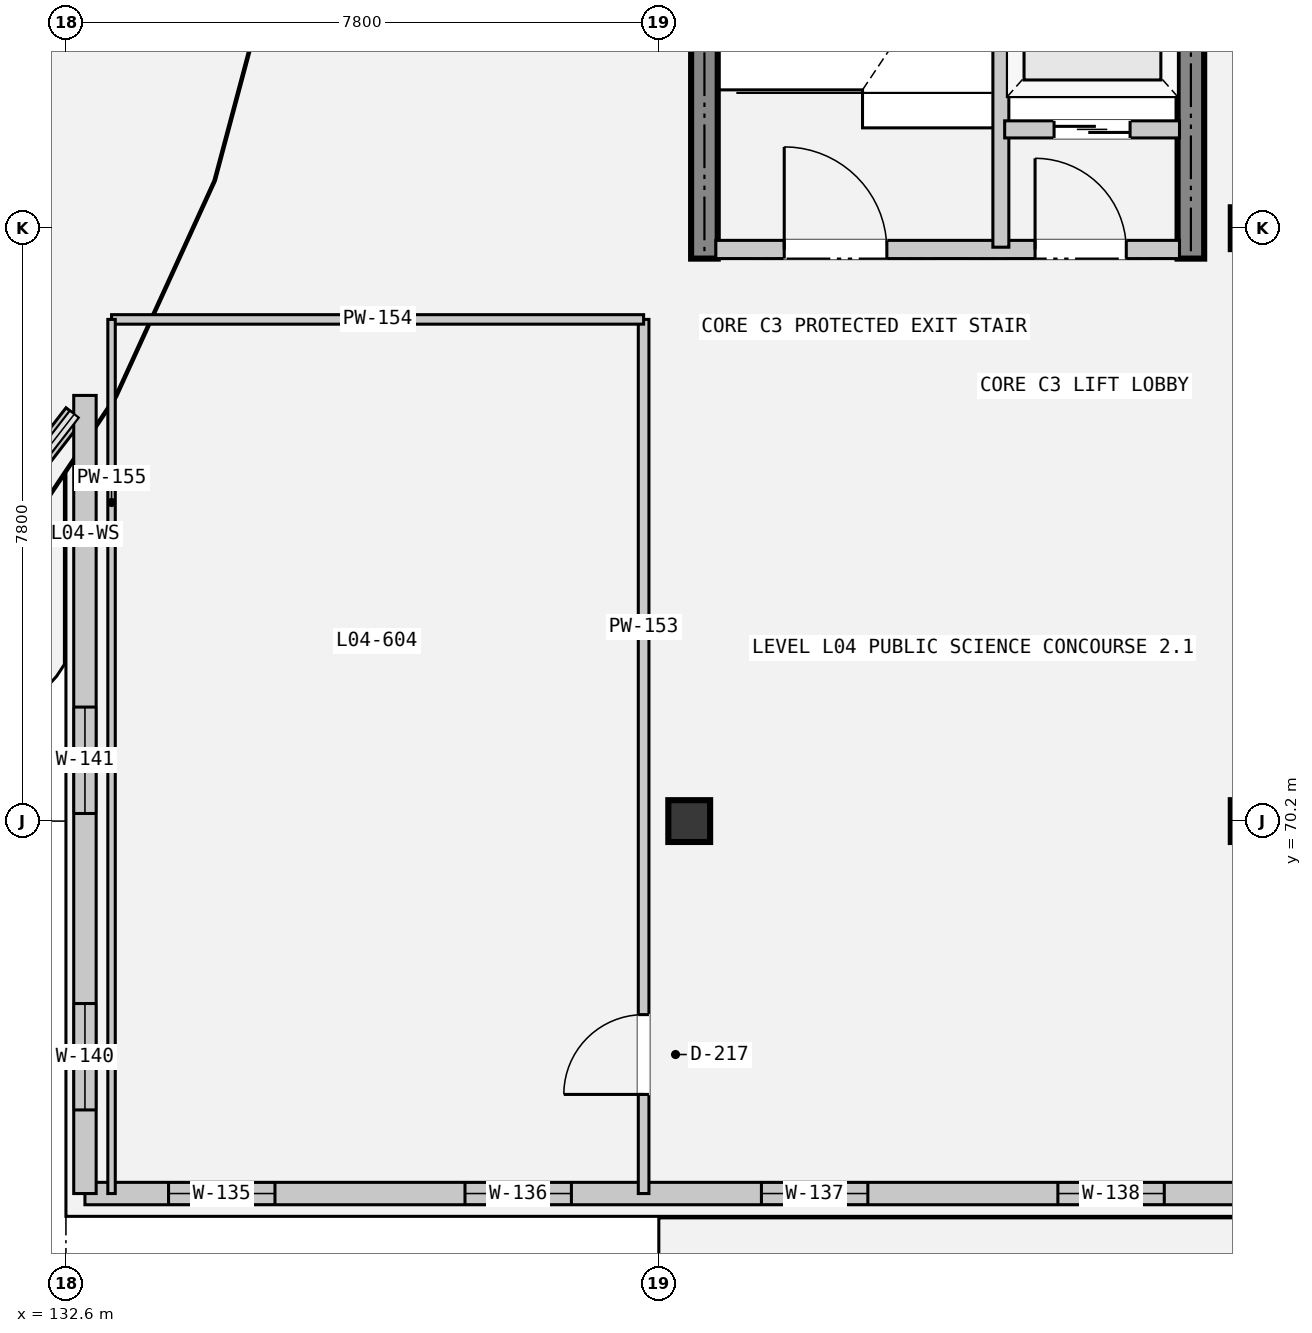
"""IFC4 building model, lengths in metres.
Left out: names, types, materials, properties, quantities, classifications, styles, units other than length and angle.
Written with IfcOpenShell. Run it as: python <this file> out.ifc"""

import sys

from ifc_helpers import new_model, si_unit, direction, frame, frame_2d, origin, origin_2d, place, context, subcontext, project, spatial, rectangle, extrude, element, fill, save


model = new_model("IFC4")
c1 = context("Model", 3, precision=1e-05, world=origin(), true_north=direction((0.0, 1.0)))
c2 = subcontext(c1, "Body", "Model", "MODEL_VIEW")
j1 = project(units=[si_unit("LENGTHUNIT", "METRE"), si_unit("PLANEANGLEUNIT", "RADIAN")], contexts=[c1])
p1 = place(None, origin())
s1 = spatial("IfcSite", under=j1, at=p1, CompositionType="ELEMENT")
p2 = place(p1, origin())
s2 = spatial("IfcBuilding", under=s1, at=p2, CompositionType="ELEMENT")
p3 = place(p2, frame((0.0, 0.0, 19.8)))
s3 = spatial("IfcBuildingStorey", under=s2, at=p3, CompositionType="ELEMENT", Elevation=19.8)
for number, where, z_axis, x_axis in (
    (1, (140.8, 70.2, 0.0), (0.0, 0.0, 1.0), (1.0, 0.0, 0.0)),
    (2, (148.2, 70.2, 0.0), (0.0, 0.0, 1.0), (1.0, 0.0, 0.0)),
    (3, (148.2, 78.0, 0.0), (0.0, 0.0, 1.0), (1.0, 0.0, 0.0)),
):
    element("IfcColumn", number, at=place(p3, frame(where, z_axis=z_axis, x_axis=x_axis)), inside=s3, PredefinedType="COLUMN", context=c2, shape_type="SweptSolid", body=[
        extrude(rectangle(XDim=0.55, YDim=0.55, at=origin_2d()), origin(), (0.0, 0.0, 1.0), 4.5),
    ])
for number, where, z_axis, x_axis in (
    (4, (141.0, 77.6, 0.0), (0.0, 0.0, 1.0), (0.0, 1.0, 0.0)),
    (5, (147.4, 77.6, 0.0), (0.0, 0.0, 1.0), (0.0, 1.0, 0.0)),
):
    element("IfcWall", number, at=place(p3, frame(where, z_axis=z_axis, x_axis=x_axis)), inside=s3, PredefinedType="SHEAR", context=c2, shape_type="SweptSolid", body=[
        extrude(rectangle(XDim=8.6, YDim=0.35, at=frame_2d((4.3, 0.0))), origin(), (0.0, 0.0, 1.0), 4.5),
    ])
p4 = place(p3, frame((129.654, 71.6, 0.0), z_axis=(0.0, 0.0, 1.0), x_axis=(0.611576816245, 0.791185059156, 0.0)))
e6 = element("IfcWall", 6, at=p4, inside=s3, PredefinedType="SOLIDWALL", context=c2, shape_type="SweptSolid", body=[
    extrude(rectangle(XDim=4.997, YDim=0.275, at=frame_2d((2.499, 0.0))), origin(), (0.0, 0.0, 1.0), 1.02),
])
p5 = place(p3, frame((132.85, 65.3, 0.0), z_axis=(0.0, 0.0, 1.0), x_axis=(1.0, 0.0, 0.0)))
e7 = element("IfcWall", 7, at=p5, inside=s3, PredefinedType="SOLIDWALL", context=c2, shape_type="SweptSolid", body=[
    extrude(rectangle(XDim=24.05, YDim=0.295, at=frame_2d((12.025, 0.0))), origin(), (0.0, 0.0, 1.0), 3.57),
])
p6 = place(p5, frame((18.95, 0.0, 0.0)))
e8 = element("IfcOpeningElement", 8, at=p6, cuts=e7, PredefinedType="OPENING", context=c2, shape_type="SweptSolid", body=[
    extrude(rectangle(XDim=1.4, YDim=2.25, at=frame_2d((0.7, 1.125))), frame((0.0, 0.157, 0.0), z_axis=(0.0, -1.0, 0.0), x_axis=(1.0, 0.0, 0.0)), (0.0, 0.0, 1.0), 0.315),
])
p7 = place(p5, frame((1.1, 0.0, 0.78)))
e9 = element("IfcOpeningElement", 9, at=p7, cuts=e7, PredefinedType="OPENING", context=c2, shape_type="SweptSolid", body=[
    extrude(rectangle(XDim=1.4, YDim=1.4, at=frame_2d((0.7, 0.7))), frame((0.0, 0.157, 0.0), z_axis=(0.0, -1.0, 0.0), x_axis=(1.0, 0.0, 0.0)), (0.0, 0.0, 1.0), 0.315),
])
p8 = place(p5, frame((5.0, 0.0, 0.78)))
e10 = element("IfcOpeningElement", 10, at=p8, cuts=e7, PredefinedType="OPENING", context=c2, shape_type="SweptSolid", body=[
    extrude(rectangle(XDim=1.4, YDim=1.4, at=frame_2d((0.7, 0.7))), frame((0.0, 0.157, 0.0), z_axis=(0.0, -1.0, 0.0), x_axis=(1.0, 0.0, 0.0)), (0.0, 0.0, 1.0), 0.315),
])
p9 = place(p5, frame((8.9, 0.0, 0.78)))
e11 = element("IfcOpeningElement", 11, at=p9, cuts=e7, PredefinedType="OPENING", context=c2, shape_type="SweptSolid", body=[
    extrude(rectangle(XDim=1.4, YDim=1.4, at=frame_2d((0.7, 0.7))), frame((0.0, 0.157, 0.0), z_axis=(0.0, -1.0, 0.0), x_axis=(1.0, 0.0, 0.0)), (0.0, 0.0, 1.0), 0.315),
])
p10 = place(p5, frame((12.8, 0.0, 0.78)))
e12 = element("IfcOpeningElement", 12, at=p10, cuts=e7, PredefinedType="OPENING", context=c2, shape_type="SweptSolid", body=[
    extrude(rectangle(XDim=1.4, YDim=1.4, at=frame_2d((0.7, 0.7))), frame((0.0, 0.157, 0.0), z_axis=(0.0, -1.0, 0.0), x_axis=(1.0, 0.0, 0.0)), (0.0, 0.0, 1.0), 0.315),
])
p11 = place(p5, frame((16.7, 0.0, 0.78)))
e13 = element("IfcOpeningElement", 13, at=p11, cuts=e7, PredefinedType="OPENING", context=c2, shape_type="SweptSolid", body=[
    extrude(rectangle(XDim=1.4, YDim=1.4, at=frame_2d((0.7, 0.7))), frame((0.0, 0.157, 0.0), z_axis=(0.0, -1.0, 0.0), x_axis=(1.0, 0.0, 0.0)), (0.0, 0.0, 1.0), 0.315),
])
p12 = place(p3, frame((132.85, 65.3, 0.0), z_axis=(0.0, 0.0, 1.0), x_axis=(0.0, 1.0, 0.0)))
e14 = element("IfcWall", 14, at=p12, inside=s3, PredefinedType="SOLIDWALL", context=c2, shape_type="SweptSolid", body=[
    extrude(rectangle(XDim=10.5, YDim=0.295, at=frame_2d((5.25, 0.0))), origin(), (0.0, 0.0, 1.0), 3.57),
])
p13 = place(p12, frame((1.1, 0.0, 0.78)))
e15 = element("IfcOpeningElement", 15, at=p13, cuts=e14, PredefinedType="OPENING", context=c2, shape_type="SweptSolid", body=[
    extrude(rectangle(XDim=1.4, YDim=1.4, at=frame_2d((0.7, 0.7))), frame((0.0, 0.157, 0.0), z_axis=(0.0, -1.0, 0.0), x_axis=(1.0, 0.0, 0.0)), (0.0, 0.0, 1.0), 0.315),
])
p14 = place(p12, frame((5.0, 0.0, 0.78)))
e16 = element("IfcOpeningElement", 16, at=p14, cuts=e14, PredefinedType="OPENING", context=c2, shape_type="SweptSolid", body=[
    extrude(rectangle(XDim=1.4, YDim=1.4, at=frame_2d((0.7, 0.7))), frame((0.0, 0.157, 0.0), z_axis=(0.0, -1.0, 0.0), x_axis=(1.0, 0.0, 0.0)), (0.0, 0.0, 1.0), 0.315),
])
p15 = place(p3, frame((141.15, 77.72, 0.0), z_axis=(0.0, 0.0, 1.0), x_axis=(1.0, 0.0, 0.0)))
e17 = element("IfcWall", 17, at=p15, inside=s3, PredefinedType="PARTITIONING", context=c2, shape_type="SweptSolid", body=[
    extrude(rectangle(XDim=6.1, YDim=0.24, at=frame_2d((3.05, 0.0))), origin(), (0.0, 0.0, 1.0), 3.57),
])
p16 = place(p15, frame((0.9, 0.0, 0.0)))
e18 = element("IfcOpeningElement", 18, at=p16, cuts=e17, PredefinedType="OPENING", context=c2, shape_type="SweptSolid", body=[
    extrude(rectangle(XDim=1.35, YDim=2.2, at=frame_2d((0.675, 1.1))), frame((0.0, 0.13, 0.0), z_axis=(0.0, -1.0, 0.0), x_axis=(1.0, 0.0, 0.0)), (0.0, 0.0, 1.0), 0.26),
])
p17 = place(p15, frame((4.2, 0.0, 0.0)))
e19 = element("IfcOpeningElement", 19, at=p17, cuts=e17, PredefinedType="OPENING", context=c2, shape_type="SweptSolid", body=[
    extrude(rectangle(XDim=1.2, YDim=2.2, at=frame_2d((0.6, 1.1))), frame((0.0, 0.13, 0.0), z_axis=(0.0, -1.0, 0.0), x_axis=(1.0, 0.0, 0.0)), (0.0, 0.0, 1.0), 0.26),
])
p18 = place(p3, frame((144.9, 77.75, 0.0), z_axis=(0.0, 0.0, 1.0), x_axis=(0.0, 1.0, 0.0)))
e20 = element("IfcWall", 20, at=p18, inside=s3, PredefinedType="PARTITIONING", context=c2, shape_type="SweptSolid", body=[
    extrude(rectangle(XDim=8.3, YDim=0.21, at=frame_2d((4.15, 0.0))), origin(), (0.0, 0.0, 1.0), 3.57),
])
p19 = place(p3, frame((144.95, 79.3, 0.0), z_axis=(0.0, 0.0, 1.0), x_axis=(1.0, 0.0, 0.0)))
e21 = element("IfcWall", 21, at=p19, inside=s3, PredefinedType="PARTITIONING", context=c2, shape_type="SweptSolid", body=[
    extrude(rectangle(XDim=2.3, YDim=0.225, at=frame_2d((1.15, 0.0))), origin(), (0.0, 0.0, 1.0), 3.57),
])
p20 = place(p19, frame((0.65, 0.0, 0.0)))
e22 = element("IfcOpeningElement", 22, at=p20, cuts=e21, PredefinedType="OPENING", context=c2, shape_type="SweptSolid", body=[
    extrude(rectangle(XDim=1.0, YDim=2.15, at=frame_2d((0.5, 1.075))), frame((0.0, 0.123, 0.0), z_axis=(0.0, -1.0, 0.0), x_axis=(1.0, 0.0, 0.0)), (0.0, 0.0, 1.0), 0.245),
])
p21 = place(p3, frame((140.2, 65.3, 0.0), z_axis=(0.0, 0.0, 1.0), x_axis=(0.0, 1.0, 0.0)))
e23 = element("IfcWall", 23, at=p21, inside=s3, PredefinedType="PARTITIONING", context=c2, shape_type="SweptSolid", body=[
    extrude(rectangle(XDim=11.5, YDim=0.14, at=frame_2d((5.75, 0.0))), origin(), (0.0, 0.0, 1.0), 3.45),
])
p22 = place(p21, frame((1.304, 0.0, 0.0)))
e24 = element("IfcOpeningElement", 24, at=p22, cuts=e23, PredefinedType="OPENING", context=c2, shape_type="SweptSolid", body=[
    extrude(rectangle(XDim=1.05, YDim=2.15, at=frame_2d((0.525, 1.075))), frame((0.0, 0.08, 0.0), z_axis=(0.0, -1.0, 0.0), x_axis=(1.0, 0.0, 0.0)), (0.0, 0.0, 1.0), 0.16),
])
p23 = place(p3, frame((140.2, 76.8, 0.0), z_axis=(0.0, 0.0, 1.0), x_axis=(-1.0, 0.0, 0.0)))
e25 = element("IfcWall", 25, at=p23, inside=s3, PredefinedType="PARTITIONING", context=c2, shape_type="SweptSolid", body=[
    extrude(rectangle(XDim=7.0, YDim=0.125, at=frame_2d((3.5, 0.0))), origin(), (0.0, 0.0, 1.0), 3.45),
])
p24 = place(p3, frame((133.2, 76.8, 0.0), z_axis=(0.0, 0.0, 1.0), x_axis=(0.0, -1.0, 0.0)))
e26 = element("IfcWall", 26, at=p24, inside=s3, PredefinedType="PARTITIONING", context=c2, shape_type="SweptSolid", body=[
    extrude(rectangle(XDim=11.5, YDim=0.098, at=frame_2d((5.75, 0.0))), origin(), (0.0, 0.0, 1.0), 3.45),
])
p25 = place(p7, origin())
e27 = element("IfcWindow", 27, at=p25, inside=s3, PartitioningType="SINGLE_PANEL", PredefinedType="WINDOW", context=c2, shape_type="SweptSolid", body=[
    extrude(rectangle(XDim=1.4, YDim=1.4, at=frame_2d((0.7, 0.7))), frame((0.0, 0.03, 0.0), z_axis=(0.0, -1.0, 0.0), x_axis=(1.0, 0.0, 0.0)), (0.0, 0.0, 1.0), 0.06),
])
fill(e9, e27)
p26 = place(p8, origin())
e28 = element("IfcWindow", 28, at=p26, inside=s3, PartitioningType="SINGLE_PANEL", PredefinedType="WINDOW", context=c2, shape_type="SweptSolid", body=[
    extrude(rectangle(XDim=1.4, YDim=1.4, at=frame_2d((0.7, 0.7))), frame((0.0, 0.03, 0.0), z_axis=(0.0, -1.0, 0.0), x_axis=(1.0, 0.0, 0.0)), (0.0, 0.0, 1.0), 0.06),
])
fill(e10, e28)
p27 = place(p9, origin())
e29 = element("IfcWindow", 29, at=p27, inside=s3, PartitioningType="SINGLE_PANEL", PredefinedType="WINDOW", context=c2, shape_type="SweptSolid", body=[
    extrude(rectangle(XDim=1.4, YDim=1.4, at=frame_2d((0.7, 0.7))), frame((0.0, 0.03, 0.0), z_axis=(0.0, -1.0, 0.0), x_axis=(1.0, 0.0, 0.0)), (0.0, 0.0, 1.0), 0.06),
])
fill(e11, e29)
p28 = place(p10, origin())
e30 = element("IfcWindow", 30, at=p28, inside=s3, PartitioningType="SINGLE_PANEL", PredefinedType="WINDOW", context=c2, shape_type="SweptSolid", body=[
    extrude(rectangle(XDim=1.4, YDim=1.4, at=frame_2d((0.7, 0.7))), frame((0.0, 0.03, 0.0), z_axis=(0.0, -1.0, 0.0), x_axis=(1.0, 0.0, 0.0)), (0.0, 0.0, 1.0), 0.06),
])
fill(e12, e30)
p29 = place(p13, origin())
e31 = element("IfcWindow", 31, at=p29, inside=s3, PartitioningType="SINGLE_PANEL", PredefinedType="WINDOW", context=c2, shape_type="SweptSolid", body=[
    extrude(rectangle(XDim=1.4, YDim=1.4, at=frame_2d((0.7, 0.7))), frame((0.0, 0.03, 0.0), z_axis=(0.0, -1.0, 0.0), x_axis=(1.0, 0.0, 0.0)), (0.0, 0.0, 1.0), 0.06),
])
fill(e15, e31)
p30 = place(p14, origin())
e32 = element("IfcWindow", 32, at=p30, inside=s3, PartitioningType="SINGLE_PANEL", PredefinedType="WINDOW", context=c2, shape_type="SweptSolid", body=[
    extrude(rectangle(XDim=1.4, YDim=1.4, at=frame_2d((0.7, 0.7))), frame((0.0, 0.03, 0.0), z_axis=(0.0, -1.0, 0.0), x_axis=(1.0, 0.0, 0.0)), (0.0, 0.0, 1.0), 0.06),
])
fill(e16, e32)
p31 = place(p16, origin())
e33 = element("IfcDoor", 33, at=p31, inside=s3, OperationType="SINGLE_SWING_RIGHT", PredefinedType="DOOR", context=c2, shape_type="SweptSolid", body=[
    extrude(rectangle(XDim=1.35, YDim=2.2, at=frame_2d((0.675, 1.1))), frame((0.0, 0.025, 0.0), z_axis=(0.0, -1.0, 0.0), x_axis=(1.0, 0.0, 0.0)), (0.0, 0.0, 1.0), 0.05),
])
fill(e18, e33)
p32 = place(p17, origin())
e34 = element("IfcDoor", 34, at=p32, inside=s3, OperationType="SINGLE_SWING_LEFT", PredefinedType="DOOR", context=c2, shape_type="SweptSolid", body=[
    extrude(rectangle(XDim=1.2, YDim=2.2, at=frame_2d((0.6, 1.1))), frame((0.0, 0.025, 0.0), z_axis=(0.0, -1.0, 0.0), x_axis=(1.0, 0.0, 0.0)), (0.0, 0.0, 1.0), 0.05),
])
fill(e19, e34)
p33 = place(p20, origin())
e35 = element("IfcDoor", 35, at=p33, inside=s3, OperationType="SLIDING_TO_RIGHT", PredefinedType="DOOR", context=c2, shape_type="SweptSolid", body=[
    extrude(rectangle(XDim=1.0, YDim=2.15, at=frame_2d((0.5, 1.075))), frame((0.0, 0.025, 0.0), z_axis=(0.0, -1.0, 0.0), x_axis=(1.0, 0.0, 0.0)), (0.0, 0.0, 1.0), 0.05),
])
fill(e22, e35)
p34 = place(p22, origin())
e36 = element("IfcDoor", 36, at=p34, inside=s3, OperationType="SINGLE_SWING_RIGHT", PredefinedType="DOOR", context=c2, shape_type="SweptSolid", body=[
    extrude(rectangle(XDim=1.05, YDim=2.15, at=frame_2d((0.525, 1.075))), frame((0.0, 0.025, 0.0), z_axis=(0.0, -1.0, 0.0), x_axis=(1.0, 0.0, 0.0)), (0.0, 0.0, 1.0), 0.05),
])
fill(e24, e36)
save(model, sys.argv[1])
